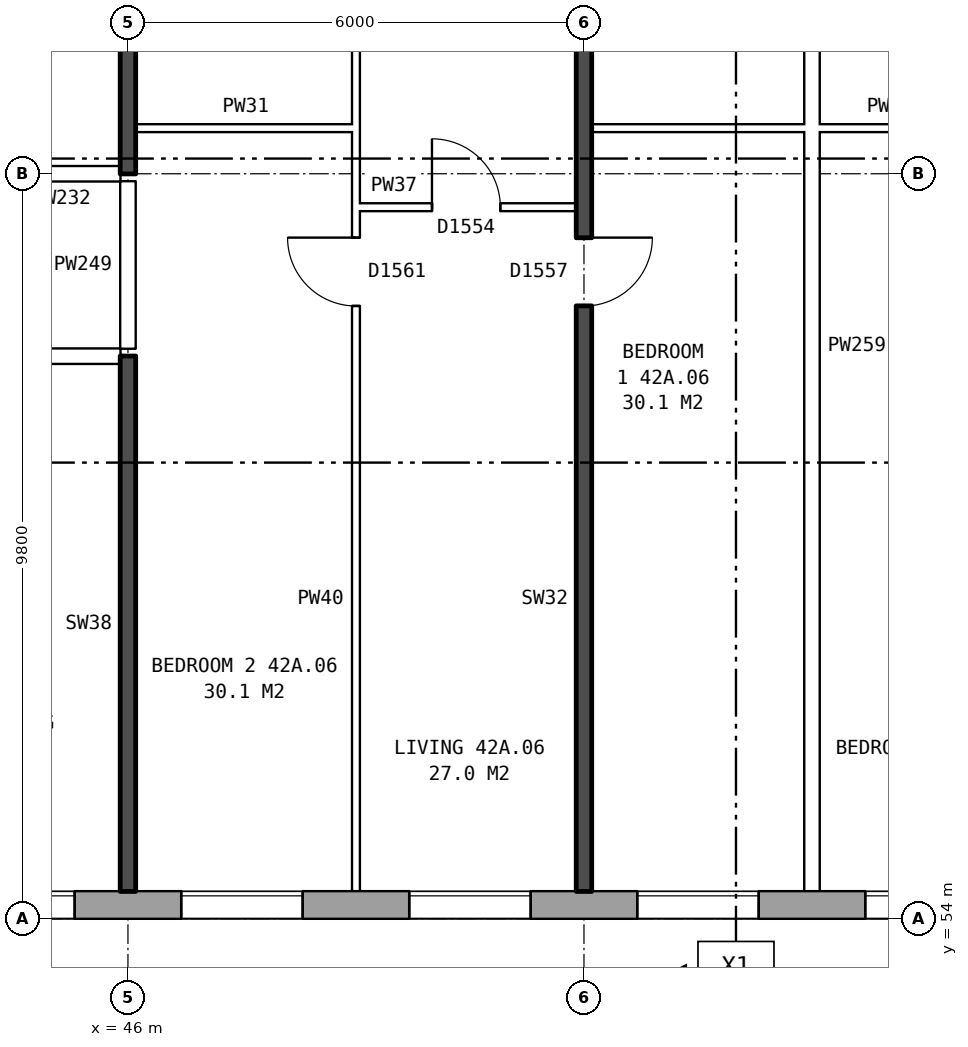
"""IFC4 building model, lengths in metres.
Left out: names, types, materials, properties, quantities, classifications, styles, units other than length and angle.
Written with IfcOpenShell. Run it as: python <this file> out.ifc"""

import sys

from ifc_helpers import new_model, si_unit, direction, frame, frame_2d, origin, place, context, subcontext, project, spatial, rectangle, extrude, element, fill, save


model = new_model("IFC4")
c1 = context("Model", 3, precision=1e-05, world=origin(), true_north=direction((0.0, 1.0)))
c2 = subcontext(c1, "Body", "Model", "MODEL_VIEW")
j1 = project(units=[si_unit("LENGTHUNIT", "METRE"), si_unit("PLANEANGLEUNIT", "RADIAN")], contexts=[c1])
p1 = place(None, origin())
s1 = spatial("IfcSite", under=j1, at=p1, CompositionType="ELEMENT")
p2 = place(p1, origin())
s2 = spatial("IfcBuilding", under=s1, at=p2, CompositionType="ELEMENT")
p3 = place(p2, frame((0.0, 0.0, 151.6)))
s3 = spatial("IfcBuildingStorey", under=s2, at=p3, CompositionType="ELEMENT", Elevation=151.6)
p4 = place(p3, frame((31.575, 54.18, 0.0), z_axis=(0.0, 0.0, 1.0), x_axis=(1.0, 0.0, 0.0)))
e1 = element("IfcWall", 1, at=p4, inside=s3, PredefinedType="STANDARD", context=c2, shape_type="SweptSolid", body=[
    extrude(rectangle(XDim=41.351, YDim=0.36, at=frame_2d((20.675, 0.0))), origin(), (0.0, 0.0, 1.0), 2.85),
])
p5 = place(p4, frame((4.625, 0.0, 0.8)))
e2 = element("IfcOpeningElement", 2, at=p5, cuts=e1, PredefinedType="OPENING", context=c2, shape_type="SweptSolid", body=[
    extrude(rectangle(XDim=1.2, YDim=1.2, at=frame_2d((0.6, 0.6))), frame((0.0, 0.19, 0.0), z_axis=(0.0, -1.0, 0.0), x_axis=(1.0, 0.0, 0.0)), (0.0, 0.0, 1.0), 0.38),
])
p6 = place(p4, frame((6.125, 0.0, 0.8)))
e3 = element("IfcOpeningElement", 3, at=p6, cuts=e1, PredefinedType="OPENING", context=c2, shape_type="SweptSolid", body=[
    extrude(rectangle(XDim=1.6, YDim=1.8, at=frame_2d((0.8, 0.9))), frame((0.0, 0.19, 0.0), z_axis=(0.0, -1.0, 0.0), x_axis=(1.0, 0.0, 0.0)), (0.0, 0.0, 1.0), 0.38),
])
p7 = place(p4, frame((9.125, 0.0, 0.8)))
e4 = element("IfcOpeningElement", 4, at=p7, cuts=e1, PredefinedType="OPENING", context=c2, shape_type="SweptSolid", body=[
    extrude(rectangle(XDim=1.6, YDim=1.8, at=frame_2d((0.8, 0.9))), frame((0.0, 0.19, 0.0), z_axis=(0.0, -1.0, 0.0), x_axis=(1.0, 0.0, 0.0)), (0.0, 0.0, 1.0), 0.38),
])
p8 = place(p4, frame((12.125, 0.0, 0.8)))
e5 = element("IfcOpeningElement", 5, at=p8, cuts=e1, PredefinedType="OPENING", context=c2, shape_type="SweptSolid", body=[
    extrude(rectangle(XDim=1.6, YDim=1.8, at=frame_2d((0.8, 0.9))), frame((0.0, 0.19, 0.0), z_axis=(0.0, -1.0, 0.0), x_axis=(1.0, 0.0, 0.0)), (0.0, 0.0, 1.0), 0.38),
])
p9 = place(p4, frame((15.125, 0.0, 0.8)))
e6 = element("IfcOpeningElement", 6, at=p9, cuts=e1, PredefinedType="OPENING", context=c2, shape_type="SweptSolid", body=[
    extrude(rectangle(XDim=1.6, YDim=1.8, at=frame_2d((0.8, 0.9))), frame((0.0, 0.19, 0.0), z_axis=(0.0, -1.0, 0.0), x_axis=(1.0, 0.0, 0.0)), (0.0, 0.0, 1.0), 0.38),
])
p10 = place(p4, frame((18.125, 0.0, 0.8)))
e7 = element("IfcOpeningElement", 7, at=p10, cuts=e1, PredefinedType="OPENING", context=c2, shape_type="SweptSolid", body=[
    extrude(rectangle(XDim=1.6, YDim=1.8, at=frame_2d((0.8, 0.9))), frame((0.0, 0.19, 0.0), z_axis=(0.0, -1.0, 0.0), x_axis=(1.0, 0.0, 0.0)), (0.0, 0.0, 1.0), 0.38),
])
p11 = place(p4, frame((21.125, 0.0, 0.8)))
e8 = element("IfcOpeningElement", 8, at=p11, cuts=e1, PredefinedType="OPENING", context=c2, shape_type="SweptSolid", body=[
    extrude(rectangle(XDim=1.6, YDim=1.8, at=frame_2d((0.8, 0.9))), frame((0.0, 0.19, 0.0), z_axis=(0.0, -1.0, 0.0), x_axis=(1.0, 0.0, 0.0)), (0.0, 0.0, 1.0), 0.38),
])
p12 = place(p4, frame((24.125, 0.0, 0.8)))
e9 = element("IfcOpeningElement", 9, at=p12, cuts=e1, PredefinedType="OPENING", context=c2, shape_type="SweptSolid", body=[
    extrude(rectangle(XDim=1.6, YDim=1.8, at=frame_2d((0.8, 0.9))), frame((0.0, 0.19, 0.0), z_axis=(0.0, -1.0, 0.0), x_axis=(1.0, 0.0, 0.0)), (0.0, 0.0, 1.0), 0.38),
])
p13 = place(p4, frame((27.125, 0.0, 0.8)))
e10 = element("IfcOpeningElement", 10, at=p13, cuts=e1, PredefinedType="OPENING", context=c2, shape_type="SweptSolid", body=[
    extrude(rectangle(XDim=1.6, YDim=1.8, at=frame_2d((0.8, 0.9))), frame((0.0, 0.19, 0.0), z_axis=(0.0, -1.0, 0.0), x_axis=(1.0, 0.0, 0.0)), (0.0, 0.0, 1.0), 0.38),
])
p14 = place(p4, frame((30.125, 0.0, 0.8)))
e11 = element("IfcOpeningElement", 11, at=p14, cuts=e1, PredefinedType="OPENING", context=c2, shape_type="SweptSolid", body=[
    extrude(rectangle(XDim=1.6, YDim=1.8, at=frame_2d((0.8, 0.9))), frame((0.0, 0.19, 0.0), z_axis=(0.0, -1.0, 0.0), x_axis=(1.0, 0.0, 0.0)), (0.0, 0.0, 1.0), 0.38),
])
p15 = place(p4, frame((33.125, 0.0, 0.8)))
e12 = element("IfcOpeningElement", 12, at=p15, cuts=e1, PredefinedType="OPENING", context=c2, shape_type="SweptSolid", body=[
    extrude(rectangle(XDim=1.6, YDim=1.8, at=frame_2d((0.8, 0.9))), frame((0.0, 0.19, 0.0), z_axis=(0.0, -1.0, 0.0), x_axis=(1.0, 0.0, 0.0)), (0.0, 0.0, 1.0), 0.38),
])
p16 = place(p4, frame((35.025, 0.0, 0.8)))
e13 = element("IfcOpeningElement", 13, at=p16, cuts=e1, PredefinedType="OPENING", context=c2, shape_type="SweptSolid", body=[
    extrude(rectangle(XDim=0.8, YDim=1.8, at=frame_2d((0.4, 0.9))), frame((0.0, 0.19, 0.0), z_axis=(0.0, -1.0, 0.0), x_axis=(1.0, 0.0, 0.0)), (0.0, 0.0, 1.0), 0.38),
])
p17 = place(p4, frame((38.625, 0.0, 1.5)))
e14 = element("IfcOpeningElement", 14, at=p17, cuts=e1, PredefinedType="OPENING", context=c2, shape_type="SweptSolid", body=[
    extrude(rectangle(XDim=0.6, YDim=0.9, at=frame_2d((0.3, 0.45))), frame((0.0, 0.19, 0.0), z_axis=(0.0, -1.0, 0.0), x_axis=(1.0, 0.0, 0.0)), (0.0, 0.0, 1.0), 0.38),
])
p18 = place(p4, frame((36.125, 0.0, 0.8)))
e15 = element("IfcOpeningElement", 15, at=p18, cuts=e1, PredefinedType="OPENING", context=c2, shape_type="SweptSolid", body=[
    extrude(rectangle(XDim=1.0, YDim=0.9, at=frame_2d((0.5, 0.45))), frame((0.0, 0.19, 0.0), z_axis=(0.0, -1.0, 0.0), x_axis=(1.0, 0.0, 0.0)), (0.0, 0.0, 1.0), 0.38),
])
p19 = place(p4, frame((39.525, 0.0, 0.8)))
e16 = element("IfcOpeningElement", 16, at=p19, cuts=e1, PredefinedType="OPENING", context=c2, shape_type="SweptSolid", body=[
    extrude(rectangle(XDim=1.4, YDim=1.8, at=frame_2d((0.7, 0.9))), frame((0.0, 0.19, 0.0), z_axis=(0.0, -1.0, 0.0), x_axis=(1.0, 0.0, 0.0)), (0.0, 0.0, 1.0), 0.38),
])
p20 = place(p3, frame((28.86, 61.4, 0.0), z_axis=(0.0, 0.0, 1.0), x_axis=(1.0, 0.0, 0.0)))
e17 = element("IfcWall", 17, at=p20, inside=s3, PredefinedType="PARTITIONING", context=c2, shape_type="SweptSolid", body=[
    extrude(rectangle(XDim=17.04, YDim=0.2, at=frame_2d((8.52, 0.0))), origin(), (0.0, 0.0, 1.0), 2.85),
])
p21 = place(p20, frame((14.59, 0.0, 0.0)))
e18 = element("IfcOpeningElement", 18, at=p21, cuts=e17, PredefinedType="OPENING", context=c2, shape_type="SweptSolid", body=[
    extrude(rectangle(XDim=1.0, YDim=2.1, at=frame_2d((0.5, 1.05))), frame((0.0, 0.11, 0.0), z_axis=(0.0, -1.0, 0.0), x_axis=(1.0, 0.0, 0.0)), (0.0, 0.0, 1.0), 0.22),
])
p22 = place(p20, frame((7.64, 0.0, 0.0)))
e19 = element("IfcOpeningElement", 19, at=p22, cuts=e17, PredefinedType="OPENING", context=c2, shape_type="SweptSolid", body=[
    extrude(rectangle(XDim=1.0, YDim=2.1, at=frame_2d((0.5, 1.05))), frame((0.0, 0.11, 0.0), z_axis=(0.0, -1.0, 0.0), x_axis=(1.0, 0.0, 0.0)), (0.0, 0.0, 1.0), 0.22),
])
p23 = place(p3, frame((49.0, 63.36, 0.0), z_axis=(0.0, 0.0, 1.0), x_axis=(1.0, 0.0, 0.0)))
e20 = element("IfcWall", 20, at=p23, inside=s3, PredefinedType="PARTITIONING", context=c2, shape_type="SweptSolid", body=[
    extrude(rectangle(XDim=2.9, YDim=0.1, at=frame_2d((1.45, 0.0))), origin(), (0.0, 0.0, 1.0), 2.85),
])
p24 = place(p23, frame((1.0, 0.0, 0.0)))
e21 = element("IfcOpeningElement", 21, at=p24, cuts=e20, PredefinedType="OPENING", context=c2, shape_type="SweptSolid", body=[
    extrude(rectangle(XDim=0.9, YDim=2.1, at=frame_2d((0.45, 1.05))), frame((0.0, 0.06, 0.0), z_axis=(0.0, -1.0, 0.0), x_axis=(1.0, 0.0, 0.0)), (0.0, 0.0, 1.0), 0.12),
])
p25 = place(p3, frame((44.36, 63.8, 0.0), z_axis=(0.0, 0.0, 1.0), x_axis=(1.0, 0.0, 0.0)))
e22 = element("IfcWall", 22, at=p25, inside=s3, PredefinedType="PARTITIONING", context=c2, shape_type="SweptSolid", body=[
    extrude(rectangle(XDim=1.54, YDim=0.2, at=frame_2d((0.77, 0.0))), origin(), (0.0, 0.0, 1.0), 2.85),
])
p26 = place(p3, frame((46.1, 64.4, 0.0), z_axis=(0.0, 0.0, 1.0), x_axis=(1.0, 0.0, 0.0)))
e23 = element("IfcWall", 23, at=p26, inside=s3, PredefinedType="PARTITIONING", context=c2, shape_type="SweptSolid", body=[
    extrude(rectangle(XDim=2.9, YDim=0.1, at=frame_2d((1.45, 0.0))), origin(), (0.0, 0.0, 1.0), 2.85),
])
p27 = place(p3, frame((52.1, 64.4, 0.0), z_axis=(0.0, 0.0, 1.0), x_axis=(1.0, 0.0, 0.0)))
e24 = element("IfcWall", 24, at=p27, inside=s3, PredefinedType="PARTITIONING", context=c2, shape_type="SweptSolid", body=[
    extrude(rectangle(XDim=5.8, YDim=0.1, at=frame_2d((2.9, 0.0))), origin(), (0.0, 0.0, 1.0), 2.85),
])
p28 = place(p3, frame((46.0, 54.36, 0.0), z_axis=(0.0, 0.0, 1.0), x_axis=(0.0, 1.0, 0.0)))
e25 = element("IfcWall", 25, at=p28, inside=s3, PredefinedType="SOLIDWALL", context=c2, shape_type="SweptSolid", body=[
    extrude(rectangle(XDim=7.04, YDim=0.2, at=frame_2d((3.52, 0.0))), origin(), (0.0, 0.0, 1.0), 2.85),
])
p29 = place(p3, frame((46.0, 61.5, 0.0), z_axis=(0.0, 0.0, 1.0), x_axis=(0.0, 1.0, 0.0)))
e26 = element("IfcWall", 26, at=p29, inside=s3, PredefinedType="PARTITIONING", context=c2, shape_type="SweptSolid", body=[
    extrude(rectangle(XDim=2.2, YDim=0.2, at=frame_2d((1.1, 0.0))), origin(), (0.0, 0.0, 1.0), 2.85),
])
p30 = place(p3, frame((46.0, 63.8, 0.0), z_axis=(0.0, 0.0, 1.0), x_axis=(0.0, 1.0, 0.0)))
e27 = element("IfcWall", 27, at=p30, inside=s3, PredefinedType="SOLIDWALL", context=c2, shape_type="SweptSolid", body=[
    extrude(rectangle(XDim=5.0, YDim=0.2, at=frame_2d((2.5, 0.0))), origin(), (0.0, 0.0, 1.0), 2.85),
])
p31 = place(p3, frame((49.0, 54.36, 0.0), z_axis=(0.0, 0.0, 1.0), x_axis=(0.0, 1.0, 0.0)))
e28 = element("IfcWall", 28, at=p31, inside=s3, PredefinedType="PARTITIONING", context=c2, shape_type="SweptSolid", body=[
    extrude(rectangle(XDim=14.34, YDim=0.1, at=frame_2d((7.17, 0.0))), origin(), (0.0, 0.0, 1.0), 2.85),
])
p32 = place(p31, frame((7.7, 0.0, 0.0)))
e29 = element("IfcOpeningElement", 29, at=p32, cuts=e28, PredefinedType="OPENING", context=c2, shape_type="SweptSolid", body=[
    extrude(rectangle(XDim=0.9, YDim=2.1, at=frame_2d((0.45, 1.05))), frame((0.0, 0.06, 0.0), z_axis=(0.0, -1.0, 0.0), x_axis=(1.0, 0.0, 0.0)), (0.0, 0.0, 1.0), 0.12),
])
p33 = place(p31, frame((13.04, 0.0, 0.0)))
e30 = element("IfcOpeningElement", 30, at=p33, cuts=e28, PredefinedType="OPENING", context=c2, shape_type="SweptSolid", body=[
    extrude(rectangle(XDim=0.9, YDim=2.1, at=frame_2d((0.45, 1.05))), frame((0.0, 0.06, 0.0), z_axis=(0.0, -1.0, 0.0), x_axis=(1.0, 0.0, 0.0)), (0.0, 0.0, 1.0), 0.12),
])
p34 = place(p3, frame((52.0, 54.36, 0.0), z_axis=(0.0, 0.0, 1.0), x_axis=(0.0, 1.0, 0.0)))
e31 = element("IfcWall", 31, at=p34, inside=s3, PredefinedType="SOLIDWALL", context=c2, shape_type="SweptSolid", body=[
    extrude(rectangle(XDim=14.44, YDim=0.2, at=frame_2d((7.22, 0.0))), origin(), (0.0, 0.0, 1.0), 2.85),
])
p35 = place(p34, frame((7.7, 0.0, 0.0)))
e32 = element("IfcOpeningElement", 32, at=p35, cuts=e31, PredefinedType="OPENING", context=c2, shape_type="SweptSolid", body=[
    extrude(rectangle(XDim=0.9, YDim=2.1, at=frame_2d((0.45, 1.05))), frame((0.0, 0.11, 0.0), z_axis=(0.0, -1.0, 0.0), x_axis=(1.0, 0.0, 0.0)), (0.0, 0.0, 1.0), 0.22),
])
p36 = place(p34, frame((13.14, 0.0, 0.0)))
e33 = element("IfcOpeningElement", 33, at=p36, cuts=e31, PredefinedType="OPENING", context=c2, shape_type="SweptSolid", body=[
    extrude(rectangle(XDim=0.9, YDim=2.1, at=frame_2d((0.45, 1.05))), frame((0.0, 0.11, 0.0), z_axis=(0.0, -1.0, 0.0), x_axis=(1.0, 0.0, 0.0)), (0.0, 0.0, 1.0), 0.22),
])
p37 = place(p3, frame((55.0, 54.36, 0.0), z_axis=(0.0, 0.0, 1.0), x_axis=(0.0, 1.0, 0.0)))
e34 = element("IfcWall", 34, at=p37, inside=s3, PredefinedType="PARTITIONING", context=c2, shape_type="SweptSolid", body=[
    extrude(rectangle(XDim=14.34, YDim=0.2, at=frame_2d((7.17, 0.0))), origin(), (0.0, 0.0, 1.0), 2.85),
])
p38 = place(p8, origin())
e35 = element("IfcWindow", 35, at=p38, inside=s3, PartitioningType="SINGLE_PANEL", PredefinedType="WINDOW", context=c2, shape_type="SweptSolid", body=[
    extrude(rectangle(XDim=1.6, YDim=1.8, at=frame_2d((0.8, 0.9))), frame((0.0, 0.15, 0.0), z_axis=(0.0, -1.0, 0.0), x_axis=(1.0, 0.0, 0.0)), (0.0, 0.0, 1.0), 0.06),
])
fill(e5, e35)
p39 = place(p9, origin())
e36 = element("IfcWindow", 36, at=p39, inside=s3, PartitioningType="SINGLE_PANEL", PredefinedType="WINDOW", context=c2, shape_type="SweptSolid", body=[
    extrude(rectangle(XDim=1.6, YDim=1.8, at=frame_2d((0.8, 0.9))), frame((0.0, 0.15, 0.0), z_axis=(0.0, -1.0, 0.0), x_axis=(1.0, 0.0, 0.0)), (0.0, 0.0, 1.0), 0.06),
])
fill(e6, e36)
p40 = place(p10, origin())
e37 = element("IfcWindow", 37, at=p40, inside=s3, PartitioningType="SINGLE_PANEL", PredefinedType="WINDOW", context=c2, shape_type="SweptSolid", body=[
    extrude(rectangle(XDim=1.6, YDim=1.8, at=frame_2d((0.8, 0.9))), frame((0.0, 0.15, 0.0), z_axis=(0.0, -1.0, 0.0), x_axis=(1.0, 0.0, 0.0)), (0.0, 0.0, 1.0), 0.06),
])
fill(e7, e37)
p41 = place(p11, origin())
e38 = element("IfcWindow", 38, at=p41, inside=s3, PartitioningType="SINGLE_PANEL", PredefinedType="WINDOW", context=c2, shape_type="SweptSolid", body=[
    extrude(rectangle(XDim=1.6, YDim=1.8, at=frame_2d((0.8, 0.9))), frame((0.0, 0.15, 0.0), z_axis=(0.0, -1.0, 0.0), x_axis=(1.0, 0.0, 0.0)), (0.0, 0.0, 1.0), 0.06),
])
fill(e8, e38)
p42 = place(p12, origin())
e39 = element("IfcWindow", 39, at=p42, inside=s3, PartitioningType="SINGLE_PANEL", PredefinedType="WINDOW", context=c2, shape_type="SweptSolid", body=[
    extrude(rectangle(XDim=1.6, YDim=1.8, at=frame_2d((0.8, 0.9))), frame((0.0, 0.15, 0.0), z_axis=(0.0, -1.0, 0.0), x_axis=(1.0, 0.0, 0.0)), (0.0, 0.0, 1.0), 0.06),
])
fill(e9, e39)
p43 = place(p35, frame((0.9, 0.0, 0.0), z_axis=(0.0, 0.0, 1.0), x_axis=(-1.0, 0.0, 0.0)))
e40 = element("IfcDoor", 40, at=p43, inside=s3, OperationType="SINGLE_SWING_LEFT", PredefinedType="DOOR", context=c2, shape_type="SweptSolid", body=[
    extrude(rectangle(XDim=0.9, YDim=2.1, at=frame_2d((0.45, 1.05))), frame((0.0, 0.025, 0.0), z_axis=(0.0, -1.0, 0.0), x_axis=(1.0, 0.0, 0.0)), (0.0, 0.0, 1.0), 0.05),
])
fill(e32, e40)
p44 = place(p32, origin())
e41 = element("IfcDoor", 41, at=p44, inside=s3, OperationType="SINGLE_SWING_RIGHT", PredefinedType="DOOR", context=c2, shape_type="SweptSolid", body=[
    extrude(rectangle(XDim=0.9, YDim=2.1, at=frame_2d((0.45, 1.05))), frame((0.0, 0.025, 0.0), z_axis=(0.0, -1.0, 0.0), x_axis=(1.0, 0.0, 0.0)), (0.0, 0.0, 1.0), 0.05),
])
fill(e29, e41)
p45 = place(p24, origin())
e42 = element("IfcDoor", 42, at=p45, inside=s3, OperationType="SINGLE_SWING_LEFT", PredefinedType="DOOR", context=c2, shape_type="SweptSolid", body=[
    extrude(rectangle(XDim=0.9, YDim=2.1, at=frame_2d((0.45, 1.05))), frame((0.0, 0.025, 0.0), z_axis=(0.0, -1.0, 0.0), x_axis=(1.0, 0.0, 0.0)), (0.0, 0.0, 1.0), 0.05),
])
fill(e21, e42)
save(model, sys.argv[1])
